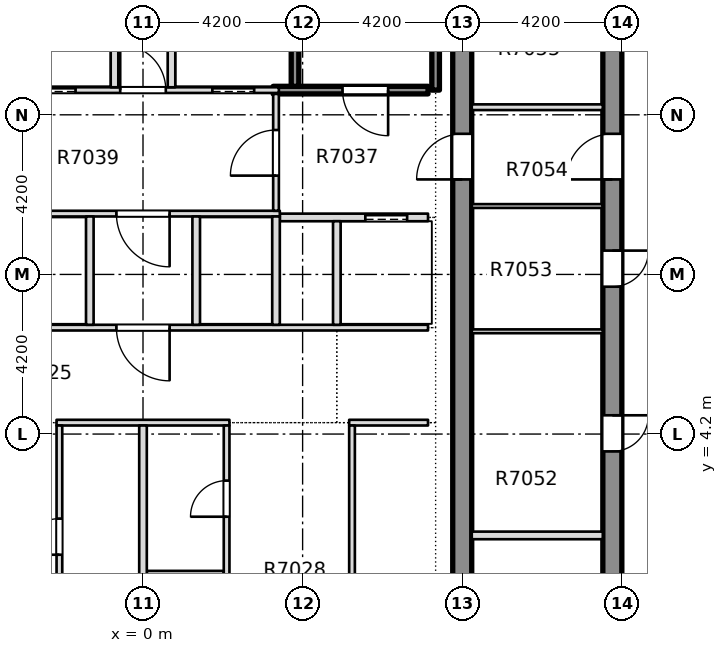
"""IFC4 building model, lengths in metres.
Left out: names, types, materials, properties, quantities, classifications, styles, units other than length and angle.
Written with IfcOpenShell. Run it as: python <this file> out.ifc"""

import sys

from ifc_helpers import new_model, si_unit, direction, frame, frame_2d, origin, place, context, subcontext, project, spatial, rectangle, extrude, element, fill, save


model = new_model("IFC4")
c1 = context("Model", 3, precision=1e-05, world=origin(), true_north=direction((0.0, 1.0)))
c2 = subcontext(c1, "Body", "Model", "MODEL_VIEW")
j1 = project(units=[si_unit("LENGTHUNIT", "METRE"), si_unit("PLANEANGLEUNIT", "RADIAN")], contexts=[c1])
p1 = place(None, origin())
s1 = spatial("IfcSite", under=j1, at=p1, CompositionType="ELEMENT")
p2 = place(p1, origin())
s2 = spatial("IfcBuilding", under=s1, at=p2, CompositionType="ELEMENT")
p3 = place(p2, frame((0.0, 0.0, 264.85)))
s3 = spatial("IfcBuildingStorey", under=s2, at=p3, CompositionType="ELEMENT", Elevation=264.85)
p4 = place(p3, frame((12.35, -8.4, -0.5), z_axis=(0.0, 0.0, 1.0), x_axis=(0.0, 1.0, 0.0)))
e1 = element("IfcWall", 1, at=p4, inside=s3, PredefinedType="SHEAR", context=c2, shape_type="SweptSolid", body=[
    extrude(rectangle(XDim=30.15, YDim=0.5, at=frame_2d((15.075, 0.0))), origin(), (0.0, 0.0, 1.0), 4.5),
])
p5 = place(p4, frame((3.416, 0.0, 0.5)))
e2 = element("IfcOpeningElement", 2, at=p5, cuts=e1, PredefinedType="OPENING", context=c2, shape_type="SweptSolid", body=[
    extrude(rectangle(XDim=0.95, YDim=2.1, at=frame_2d((0.475, 1.05))), frame((0.0, 0.26, 0.0), z_axis=(0.0, -1.0, 0.0), x_axis=(1.0, 0.0, 0.0)), (0.0, 0.0, 1.0), 0.52),
])
p6 = place(p4, frame((7.932, 0.0, 0.5)))
e3 = element("IfcOpeningElement", 3, at=p6, cuts=e1, PredefinedType="OPENING", context=c2, shape_type="SweptSolid", body=[
    extrude(rectangle(XDim=0.95, YDim=2.1, at=frame_2d((0.475, 1.05))), frame((0.0, 0.26, 0.0), z_axis=(0.0, -1.0, 0.0), x_axis=(1.0, 0.0, 0.0)), (0.0, 0.0, 1.0), 0.52),
])
p7 = place(p4, frame((12.144, 0.0, 0.5)))
e4 = element("IfcOpeningElement", 4, at=p7, cuts=e1, PredefinedType="OPENING", context=c2, shape_type="SweptSolid", body=[
    extrude(rectangle(XDim=0.95, YDim=2.1, at=frame_2d((0.475, 1.05))), frame((0.0, 0.26, 0.0), z_axis=(0.0, -1.0, 0.0), x_axis=(1.0, 0.0, 0.0)), (0.0, 0.0, 1.0), 0.52),
])
p8 = place(p4, frame((16.477, 0.0, 0.5)))
e5 = element("IfcOpeningElement", 5, at=p8, cuts=e1, PredefinedType="OPENING", context=c2, shape_type="SweptSolid", body=[
    extrude(rectangle(XDim=0.95, YDim=2.1, at=frame_2d((0.475, 1.05))), frame((0.0, 0.26, 0.0), z_axis=(0.0, -1.0, 0.0), x_axis=(1.0, 0.0, 0.0)), (0.0, 0.0, 1.0), 0.52),
])
p9 = place(p4, frame((23.605, 0.0, 0.5)))
e6 = element("IfcOpeningElement", 6, at=p9, cuts=e1, PredefinedType="OPENING", context=c2, shape_type="SweptSolid", body=[
    extrude(rectangle(XDim=0.95, YDim=2.1, at=frame_2d((0.475, 1.05))), frame((0.0, 0.26, 0.0), z_axis=(0.0, -1.0, 0.0), x_axis=(1.0, 0.0, 0.0)), (0.0, 0.0, 1.0), 0.52),
])
p10 = place(p4, frame((27.63, 0.0, 0.5)))
e7 = element("IfcOpeningElement", 7, at=p10, cuts=e1, PredefinedType="OPENING", context=c2, shape_type="SweptSolid", body=[
    extrude(rectangle(XDim=0.95, YDim=2.1, at=frame_2d((0.475, 1.05))), frame((0.0, 0.26, 0.0), z_axis=(0.0, -1.0, 0.0), x_axis=(1.0, 0.0, 0.0)), (0.0, 0.0, 1.0), 0.52),
])
p11 = place(p4, frame((19.3, 0.0, 0.5)))
e8 = element("IfcOpeningElement", 8, at=p11, cuts=e1, PredefinedType="OPENING", context=c2, shape_type="SweptSolid", body=[
    extrude(rectangle(XDim=1.2, YDim=2.1, at=frame_2d((0.6, 1.05))), frame((0.0, 0.26, 0.0), z_axis=(0.0, -1.0, 0.0), x_axis=(1.0, 0.0, 0.0)), (0.0, 0.0, 1.0), 0.52),
])
p12 = place(p3, frame((8.4, -7.9, -0.5), z_axis=(0.0, 0.0, 1.0), x_axis=(0.0, 1.0, 0.0)))
e9 = element("IfcWall", 9, at=p12, inside=s3, PredefinedType="SHEAR", context=c2, shape_type="SweptSolid", body=[
    extrude(rectangle(XDim=29.15, YDim=0.5, at=frame_2d((14.575, 0.0))), origin(), (0.0, 0.0, 1.0), 4.5),
])
p13 = place(p12, frame((18.8, 0.0, 0.5)))
e10 = element("IfcOpeningElement", 10, at=p13, cuts=e9, PredefinedType="OPENING", context=c2, shape_type="SweptSolid", body=[
    extrude(rectangle(XDim=1.2, YDim=2.1, at=frame_2d((0.6, 1.05))), frame((0.0, 0.26, 0.0), z_axis=(0.0, -1.0, 0.0), x_axis=(1.0, 0.0, 0.0)), (0.0, 0.0, 1.0), 0.52),
])
p14 = place(p3, frame((0.1, 0.5, 0.0), z_axis=(0.0, 0.0, 1.0), x_axis=(1.0, 0.0, 0.0)))
e11 = element("IfcWall", 11, at=p14, inside=s3, PredefinedType="PARTITIONING", context=c2, shape_type="SweptSolid", body=[
    extrude(rectangle(XDim=2.025, YDim=0.2, at=frame_2d((1.012, 0.0))), origin(), (0.0, 0.0, 1.0), 4.0),
])
p15 = place(p3, frame((-2.275, 4.5, 0.0), z_axis=(0.0, 0.0, 1.0), x_axis=(1.0, 0.0, 0.0)))
e12 = element("IfcWall", 12, at=p15, inside=s3, PredefinedType="PARTITIONING", context=c2, shape_type="SweptSolid", body=[
    extrude(rectangle(XDim=4.55, YDim=0.15, at=frame_2d((2.275, 0.0))), origin(), (0.0, 0.0, 1.0), 2.5),
])
p16 = place(p3, frame((5.425, 4.5, 0.0), z_axis=(0.0, 0.0, 1.0), x_axis=(1.0, 0.0, 0.0)))
e13 = element("IfcWall", 13, at=p16, inside=s3, PredefinedType="PARTITIONING", context=c2, shape_type="SweptSolid", body=[
    extrude(rectangle(XDim=2.075, YDim=0.15, at=frame_2d((1.038, 0.0))), origin(), (0.0, 0.0, 1.0), 2.5),
])
p17 = place(p3, frame((-7.5, 7.0, 0.0), z_axis=(0.0, 0.0, 1.0), x_axis=(1.0, 0.0, 0.0)))
e14 = element("IfcWall", 14, at=p17, inside=s3, PredefinedType="PARTITIONING", context=c2, shape_type="SweptSolid", body=[
    extrude(rectangle(XDim=15.0, YDim=0.15, at=frame_2d((7.5, 0.0))), origin(), (0.0, 0.0, 1.0), 4.0),
])
p18 = place(p17, frame((6.8, 0.0, 0.0)))
e15 = element("IfcOpeningElement", 15, at=p18, cuts=e14, PredefinedType="OPENING", context=c2, shape_type="SweptSolid", body=[
    extrude(rectangle(XDim=1.4, YDim=2.1, at=frame_2d((0.7, 1.05))), frame((0.0, 0.085, 0.0), z_axis=(0.0, -1.0, 0.0), x_axis=(1.0, 0.0, 0.0)), (0.0, 0.0, 1.0), 0.17),
])
p19 = place(p3, frame((3.6, 9.9, 0.0), z_axis=(0.0, 0.0, 1.0), x_axis=(1.0, 0.0, 0.0)))
e16 = element("IfcWall", 16, at=p19, inside=s3, PredefinedType="PARTITIONING", context=c2, shape_type="SweptSolid", body=[
    extrude(rectangle(XDim=3.9, YDim=0.2, at=frame_2d((1.95, 0.0))), origin(), (0.0, 0.0, 1.0), 4.0),
])
p20 = place(p19, frame((2.25, 0.0, 0.0)))
e17 = element("IfcOpeningElement", 17, at=p20, cuts=e16, PredefinedType="OPENING", context=c2, shape_type="SweptSolid", body=[
    extrude(rectangle(XDim=1.1, YDim=2.1, at=frame_2d((0.55, 1.05))), frame((0.0, 0.11, 0.0), z_axis=(0.0, -1.0, 0.0), x_axis=(1.0, 0.0, 0.0)), (0.0, 0.0, 1.0), 0.22),
])
p21 = place(p3, frame((-3.6, 10.0, 0.0), z_axis=(0.0, 0.0, 1.0), x_axis=(1.0, 0.0, 0.0)))
e18 = element("IfcWall", 18, at=p21, inside=s3, PredefinedType="PARTITIONING", context=c2, shape_type="SweptSolid", body=[
    extrude(rectangle(XDim=7.2, YDim=0.15, at=frame_2d((3.6, 0.0))), origin(), (0.0, 0.0, 1.0), 4.0),
])
p22 = place(p21, frame((2.9, 0.0, 0.0)))
e19 = element("IfcOpeningElement", 19, at=p22, cuts=e18, PredefinedType="OPENING", context=c2, shape_type="SweptSolid", body=[
    extrude(rectangle(XDim=1.4, YDim=2.1, at=frame_2d((0.7, 1.05))), frame((0.0, 0.085, 0.0), z_axis=(0.0, -1.0, 0.0), x_axis=(1.0, 0.0, 0.0)), (0.0, 0.0, 1.0), 0.17),
])
p23 = place(p3, frame((-3.575, 13.25, 0.0), z_axis=(0.0, 0.0, 1.0), x_axis=(1.0, 0.0, 0.0)))
e20 = element("IfcWall", 20, at=p23, inside=s3, PredefinedType="PARTITIONING", context=c2, shape_type="SweptSolid", body=[
    extrude(rectangle(XDim=7.15, YDim=0.15, at=frame_2d((3.575, 0.0))), origin(), (0.0, 0.0, 1.0), 4.0),
])
p24 = place(p23, frame((0.6, 0.0, 0.0)))
e21 = element("IfcOpeningElement", 21, at=p24, cuts=e20, PredefinedType="OPENING", context=c2, shape_type="SweptSolid", body=[
    extrude(rectangle(XDim=1.2, YDim=2.1, at=frame_2d((0.6, 1.05))), frame((0.0, 0.085, 0.0), z_axis=(0.0, -1.0, 0.0), x_axis=(1.0, 0.0, 0.0)), (0.0, 0.0, 1.0), 0.17),
])
p25 = place(p23, frame((5.4, 0.0, 0.0)))
e22 = element("IfcOpeningElement", 22, at=p25, cuts=e20, PredefinedType="OPENING", context=c2, shape_type="SweptSolid", body=[
    extrude(rectangle(XDim=1.1, YDim=2.1, at=frame_2d((0.55, 1.05))), frame((0.0, 0.085, 0.0), z_axis=(0.0, -1.0, 0.0), x_axis=(1.0, 0.0, 0.0)), (0.0, 0.0, 1.0), 0.17),
])
p26 = place(p23, frame((2.975, 0.0, 0.0)))
e23 = element("IfcOpeningElement", 23, at=p26, cuts=e20, PredefinedType="OPENING", context=c2, shape_type="SweptSolid", body=[
    extrude(rectangle(XDim=1.2, YDim=2.1, at=frame_2d((0.6, 1.05))), frame((0.0, 0.085, 0.0), z_axis=(0.0, -1.0, 0.0), x_axis=(1.0, 0.0, 0.0)), (0.0, 0.0, 1.0), 0.17),
])
p27 = place(p3, frame((3.425, 13.25, 0.0), z_axis=(0.0, 0.0, 1.0), x_axis=(1.0, 0.0, 0.0)))
e24 = element("IfcWall", 24, at=p27, inside=s3, PredefinedType="SOLIDWALL", context=c2, shape_type="SweptSolid", body=[
    extrude(rectangle(XDim=4.075, YDim=0.2, at=frame_2d((2.038, 0.0))), origin(), (0.0, 0.0, 1.0), 4.0),
])
p28 = place(p27, frame((1.825, 0.0, 0.0)))
e25 = element("IfcOpeningElement", 25, at=p28, cuts=e24, PredefinedType="OPENING", context=c2, shape_type="SweptSolid", body=[
    extrude(rectangle(XDim=1.2, YDim=2.1, at=frame_2d((0.6, 1.05))), frame((0.0, 0.11, 0.0), z_axis=(0.0, -1.0, 0.0), x_axis=(1.0, 0.0, 0.0)), (0.0, 0.0, 1.0), 0.22),
])
p29 = place(p3, frame((-2.2, -7.899, 0.0), z_axis=(0.0, 0.0, 1.0), x_axis=(0.0, 1.0, 0.0)))
e26 = element("IfcWall", 26, at=p29, inside=s3, PredefinedType="PARTITIONING", context=c2, shape_type="SweptSolid", body=[
    extrude(rectangle(XDim=12.324, YDim=0.15, at=frame_2d((6.162, 0.0))), origin(), (0.0, 0.0, 1.0), 4.0),
])
p30 = place(p29, frame((1.349, 0.0, 0.0)))
e27 = element("IfcOpeningElement", 27, at=p30, cuts=e26, PredefinedType="OPENING", context=c2, shape_type="SweptSolid", body=[
    extrude(rectangle(XDim=1.1, YDim=2.1, at=frame_2d((0.55, 1.05))), frame((0.0, 0.085, 0.0), z_axis=(0.0, -1.0, 0.0), x_axis=(1.0, 0.0, 0.0)), (0.0, 0.0, 1.0), 0.17),
])
p31 = place(p29, frame((4.424, 0.0, 0.0)))
e28 = element("IfcOpeningElement", 28, at=p31, cuts=e26, PredefinedType="OPENING", context=c2, shape_type="SweptSolid", body=[
    extrude(rectangle(XDim=0.95, YDim=2.1, at=frame_2d((0.475, 1.05))), frame((0.0, 0.085, 0.0), z_axis=(0.0, -1.0, 0.0), x_axis=(1.0, 0.0, 0.0)), (0.0, 0.0, 1.0), 0.17),
])
p32 = place(p29, frame((8.924, 0.0, 0.0)))
e29 = element("IfcOpeningElement", 29, at=p32, cuts=e26, PredefinedType="OPENING", context=c2, shape_type="SweptSolid", body=[
    extrude(rectangle(XDim=0.95, YDim=2.1, at=frame_2d((0.475, 1.05))), frame((0.0, 0.085, 0.0), z_axis=(0.0, -1.0, 0.0), x_axis=(1.0, 0.0, 0.0)), (0.0, 0.0, 1.0), 0.17),
])
p33 = place(p3, frame((-1.4, 7.075, 0.0), z_axis=(0.0, 0.0, 1.0), x_axis=(0.0, 1.0, 0.0)))
e30 = element("IfcWall", 30, at=p33, inside=s3, PredefinedType="PARTITIONING", context=c2, shape_type="SweptSolid", body=[
    extrude(rectangle(XDim=2.85, YDim=0.2, at=frame_2d((1.425, 0.0))), origin(), (0.0, 0.0, 1.0), 4.0),
])
p34 = place(p3, frame((-0.75, 13.325, 0.0), z_axis=(0.0, 0.0, 1.0), x_axis=(0.0, 1.0, 0.0)))
e31 = element("IfcWall", 31, at=p34, inside=s3, PredefinedType="PARTITIONING", context=c2, shape_type="SweptSolid", body=[
    extrude(rectangle(XDim=7.924, YDim=0.2, at=frame_2d((3.962, 0.0))), origin(), (0.0, 0.0, 1.0), 4.0),
])
p35 = place(p34, frame((4.8, 0.0, 0.0)))
e32 = element("IfcOpeningElement", 32, at=p35, cuts=e31, PredefinedType="OPENING", context=c2, shape_type="SweptSolid", body=[
    extrude(rectangle(XDim=0.95, YDim=2.1, at=frame_2d((0.475, 1.05))), frame((0.0, 0.11, 0.0), z_axis=(0.0, -1.0, 0.0), x_axis=(1.0, 0.0, 0.0)), (0.0, 0.0, 1.0), 0.22),
])
p36 = place(p3, frame((0.0, -7.899, 0.0), z_axis=(0.0, 0.0, 1.0), x_axis=(0.0, 1.0, 0.0)))
e33 = element("IfcWall", 33, at=p36, inside=s3, PredefinedType="PARTITIONING", context=c2, shape_type="SweptSolid", body=[
    extrude(rectangle(XDim=12.324, YDim=0.2, at=frame_2d((6.162, 0.0))), origin(), (0.0, 0.0, 1.0), 4.0),
])
p37 = place(p3, frame((0.75, 13.325, 0.0), z_axis=(0.0, 0.0, 1.0), x_axis=(0.0, 1.0, 0.0)))
e34 = element("IfcWall", 34, at=p37, inside=s3, PredefinedType="PARTITIONING", context=c2, shape_type="SweptSolid", body=[
    extrude(rectangle(XDim=2.625, YDim=0.2, at=frame_2d((1.312, 0.0))), origin(), (0.0, 0.0, 1.0), 4.0),
])
p38 = place(p3, frame((1.4, 7.075, 0.0), z_axis=(0.0, 0.0, 1.0), x_axis=(0.0, 1.0, 0.0)))
e35 = element("IfcWall", 35, at=p38, inside=s3, PredefinedType="PARTITIONING", context=c2, shape_type="SweptSolid", body=[
    extrude(rectangle(XDim=2.85, YDim=0.2, at=frame_2d((1.425, 0.0))), origin(), (0.0, 0.0, 1.0), 4.0),
])
p39 = place(p3, frame((2.2, -7.899, 0.0), z_axis=(0.0, 0.0, 1.0), x_axis=(0.0, 1.0, 0.0)))
e36 = element("IfcWall", 36, at=p39, inside=s3, PredefinedType="PARTITIONING", context=c2, shape_type="SweptSolid", body=[
    extrude(rectangle(XDim=12.324, YDim=0.15, at=frame_2d((6.162, 0.0))), origin(), (0.0, 0.0, 1.0), 4.0),
])
p40 = place(p39, frame((1.924, 0.0, 0.0)))
e37 = element("IfcOpeningElement", 37, at=p40, cuts=e36, PredefinedType="OPENING", context=c2, shape_type="SweptSolid", body=[
    extrude(rectangle(XDim=0.95, YDim=2.1, at=frame_2d((0.475, 1.05))), frame((0.0, 0.085, 0.0), z_axis=(0.0, -1.0, 0.0), x_axis=(1.0, 0.0, 0.0)), (0.0, 0.0, 1.0), 0.17),
])
p41 = place(p39, frame((5.924, 0.0, 0.0)))
e38 = element("IfcOpeningElement", 38, at=p41, cuts=e36, PredefinedType="OPENING", context=c2, shape_type="SweptSolid", body=[
    extrude(rectangle(XDim=0.95, YDim=2.1, at=frame_2d((0.475, 1.05))), frame((0.0, 0.085, 0.0), z_axis=(0.0, -1.0, 0.0), x_axis=(1.0, 0.0, 0.0)), (0.0, 0.0, 1.0), 0.17),
])
p42 = place(p39, frame((9.924, 0.0, 0.0)))
e39 = element("IfcOpeningElement", 39, at=p42, cuts=e36, PredefinedType="OPENING", context=c2, shape_type="SweptSolid", body=[
    extrude(rectangle(XDim=0.95, YDim=2.1, at=frame_2d((0.475, 1.05))), frame((0.0, 0.085, 0.0), z_axis=(0.0, -1.0, 0.0), x_axis=(1.0, 0.0, 0.0)), (0.0, 0.0, 1.0), 0.17),
])
p43 = place(p3, frame((3.5, 7.075, 0.0), z_axis=(0.0, 0.0, 1.0), x_axis=(0.0, 1.0, 0.0)))
e40 = element("IfcWall", 40, at=p43, inside=s3, PredefinedType="PARTITIONING", context=c2, shape_type="SweptSolid", body=[
    extrude(rectangle(XDim=2.85, YDim=0.2, at=frame_2d((1.425, 0.0))), origin(), (0.0, 0.0, 1.0), 4.0),
])
p44 = place(p3, frame((3.5, 10.075, 0.0), z_axis=(0.0, 0.0, 1.0), x_axis=(0.0, 1.0, 0.0)))
e41 = element("IfcWall", 41, at=p44, inside=s3, PredefinedType="PARTITIONING", context=c2, shape_type="SweptSolid", body=[
    extrude(rectangle(XDim=3.075, YDim=0.15, at=frame_2d((1.538, 0.0))), origin(), (0.0, 0.0, 1.0), 4.0),
])
p45 = place(p44, frame((0.925, 0.0, 0.0)))
e42 = element("IfcOpeningElement", 42, at=p45, cuts=e41, PredefinedType="OPENING", context=c2, shape_type="SweptSolid", body=[
    extrude(rectangle(XDim=1.2, YDim=2.1, at=frame_2d((0.6, 1.05))), frame((0.0, 0.085, 0.0), z_axis=(0.0, -1.0, 0.0), x_axis=(1.0, 0.0, 0.0)), (0.0, 0.0, 1.0), 0.17),
])
p46 = place(p3, frame((4.0, 13.35, 0.0), z_axis=(0.0, 0.0, 1.0), x_axis=(0.0, 1.0, 0.0)))
e43 = element("IfcWall", 43, at=p46, inside=s3, PredefinedType="SOLIDWALL", context=c2, shape_type="SweptSolid", body=[
    extrude(rectangle(XDim=2.6, YDim=0.2, at=frame_2d((1.3, 0.0))), origin(), (0.0, 0.0, 1.0), 4.0),
])
p47 = place(p3, frame((5.1, 7.075, 0.0), z_axis=(0.0, 0.0, 1.0), x_axis=(0.0, 1.0, 0.0)))
e44 = element("IfcWall", 44, at=p47, inside=s3, PredefinedType="PARTITIONING", context=c2, shape_type="SweptSolid", body=[
    extrude(rectangle(XDim=2.725, YDim=0.2, at=frame_2d((1.363, 0.0))), origin(), (0.0, 0.0, 1.0), 4.0),
])
p48 = place(p3, frame((5.5, -7.899, 0.0), z_axis=(0.0, 0.0, 1.0), x_axis=(0.0, 1.0, 0.0)))
e45 = element("IfcWall", 45, at=p48, inside=s3, PredefinedType="PARTITIONING", context=c2, shape_type="SweptSolid", body=[
    extrude(rectangle(XDim=12.324, YDim=0.15, at=frame_2d((6.162, 0.0))), origin(), (0.0, 0.0, 1.0), 4.0),
])
p49 = place(p48, frame((5.924, 0.0, 0.0)))
e46 = element("IfcOpeningElement", 46, at=p49, cuts=e45, PredefinedType="OPENING", context=c2, shape_type="SweptSolid", body=[
    extrude(rectangle(XDim=0.95, YDim=2.1, at=frame_2d((0.475, 1.05))), frame((0.0, 0.085, 0.0), z_axis=(0.0, -1.0, 0.0), x_axis=(1.0, 0.0, 0.0)), (0.0, 0.0, 1.0), 0.17),
])
p50 = place(p3, frame((8.651, 1.533, 0.0), z_axis=(0.0, 0.0, 1.0), x_axis=(1.0, 0.0, 0.0)))
e47 = element("IfcWall", 47, at=p50, inside=s3, PredefinedType="PARTITIONING", context=c2, shape_type="SweptSolid", body=[
    extrude(rectangle(XDim=3.448, YDim=0.2, at=frame_2d((1.724, 0.0))), origin(), (0.0, 0.0, 1.0), 4.0),
])
for number, where, z_axis, x_axis in (
    (48, (8.651, 6.904, 0.0), (0.0, 0.0, 1.0), (1.0, 0.0, 0.0)),
    (49, (8.651, 10.2, 0.0), (0.0, 0.0, 1.0), (1.0, 0.0, 0.0)),
):
    element("IfcWall", number, at=place(p3, frame(where, z_axis=z_axis, x_axis=x_axis)), inside=s3, PredefinedType="PARTITIONING", context=c2, shape_type="SweptSolid", body=[
        extrude(rectangle(XDim=3.448, YDim=0.1, at=frame_2d((1.724, 0.0))), origin(), (0.0, 0.0, 1.0), 4.0),
    ])
p51 = place(p3, frame((8.651, 12.8, 0.0), z_axis=(0.0, 0.0, 1.0), x_axis=(1.0, 0.0, 0.0)))
e50 = element("IfcWall", 50, at=p51, inside=s3, PredefinedType="PARTITIONING", context=c2, shape_type="SweptSolid", body=[
    extrude(rectangle(XDim=3.448, YDim=0.15, at=frame_2d((1.724, 0.0))), origin(), (0.0, 0.0, 1.0), 2.5),
])
p52 = place(p3, frame((7.7, 13.25, 0.0), z_axis=(0.0, 0.0, 1.0), x_axis=(0.0, 1.0, 0.0)))
e51 = element("IfcWall", 51, at=p52, inside=s3, PredefinedType="SOLIDWALL", context=c2, shape_type="SweptSolid", body=[
    extrude(rectangle(XDim=7.6, YDim=0.2, at=frame_2d((3.8, 0.0))), origin(), (0.0, 0.0, 1.0), 4.0),
])
p53 = place(p32, origin())
e52 = element("IfcDoor", 52, at=p53, inside=s3, OperationType="SINGLE_SWING_LEFT", PredefinedType="DOOR", context=c2, shape_type="SweptSolid", body=[
    extrude(rectangle(XDim=0.95, YDim=2.1, at=frame_2d((0.475, 1.05))), frame((0.0, 0.025, 0.0), z_axis=(0.0, -1.0, 0.0), x_axis=(1.0, 0.0, 0.0)), (0.0, 0.0, 1.0), 0.05),
])
fill(e29, e52)
p54 = place(p42, origin())
e53 = element("IfcDoor", 53, at=p54, inside=s3, OperationType="SINGLE_SWING_LEFT", PredefinedType="DOOR", context=c2, shape_type="SweptSolid", body=[
    extrude(rectangle(XDim=0.95, YDim=2.1, at=frame_2d((0.475, 1.05))), frame((0.0, 0.025, 0.0), z_axis=(0.0, -1.0, 0.0), x_axis=(1.0, 0.0, 0.0)), (0.0, 0.0, 1.0), 0.05),
])
fill(e39, e53)
p55 = place(p28, origin())
e54 = element("IfcDoor", 54, at=p55, inside=s3, OperationType="SINGLE_SWING_RIGHT", PredefinedType="DOOR", context=c2, shape_type="SweptSolid", body=[
    extrude(rectangle(XDim=1.2, YDim=2.1, at=frame_2d((0.6, 1.05))), frame((0.0, 0.025, 0.0), z_axis=(0.0, -1.0, 0.0), x_axis=(1.0, 0.0, 0.0)), (0.0, 0.0, 1.0), 0.05),
])
fill(e25, e54)
p56 = place(p20, origin())
e55 = element("IfcDoor", 55, at=p56, inside=s3, OperationType="SLIDING_TO_LEFT", PredefinedType="DOOR", context=c2, shape_type="SweptSolid", body=[
    extrude(rectangle(XDim=1.1, YDim=2.1, at=frame_2d((0.55, 1.05))), frame((0.0, 0.025, 0.0), z_axis=(0.0, -1.0, 0.0), x_axis=(1.0, 0.0, 0.0)), (0.0, 0.0, 1.0), 0.05),
])
fill(e17, e55)
p57 = place(p18, origin())
e56 = element("IfcDoor", 56, at=p57, inside=s3, OperationType="SINGLE_SWING_RIGHT", PredefinedType="DOOR", context=c2, shape_type="SweptSolid", body=[
    extrude(rectangle(XDim=1.4, YDim=2.1, at=frame_2d((0.7, 1.05))), frame((0.0, 0.025, 0.0), z_axis=(0.0, -1.0, 0.0), x_axis=(1.0, 0.0, 0.0)), (0.0, 0.0, 1.0), 0.05),
])
fill(e15, e56)
p58 = place(p22, origin())
e57 = element("IfcDoor", 57, at=p58, inside=s3, OperationType="SINGLE_SWING_RIGHT", PredefinedType="DOOR", context=c2, shape_type="SweptSolid", body=[
    extrude(rectangle(XDim=1.4, YDim=2.1, at=frame_2d((0.7, 1.05))), frame((0.0, 0.025, 0.0), z_axis=(0.0, -1.0, 0.0), x_axis=(1.0, 0.0, 0.0)), (0.0, 0.0, 1.0), 0.05),
])
fill(e19, e57)
p59 = place(p24, origin())
e58 = element("IfcDoor", 58, at=p59, inside=s3, OperationType="SLIDING_TO_RIGHT", PredefinedType="DOOR", context=c2, shape_type="SweptSolid", body=[
    extrude(rectangle(XDim=1.2, YDim=2.1, at=frame_2d((0.6, 1.05))), frame((0.0, 0.025, 0.0), z_axis=(0.0, -1.0, 0.0), x_axis=(1.0, 0.0, 0.0)), (0.0, 0.0, 1.0), 0.05),
])
fill(e21, e58)
p60 = place(p25, origin())
e59 = element("IfcDoor", 59, at=p60, inside=s3, OperationType="SLIDING_TO_LEFT", PredefinedType="DOOR", context=c2, shape_type="SweptSolid", body=[
    extrude(rectangle(XDim=1.1, YDim=2.1, at=frame_2d((0.55, 1.05))), frame((0.0, 0.025, 0.0), z_axis=(0.0, -1.0, 0.0), x_axis=(1.0, 0.0, 0.0)), (0.0, 0.0, 1.0), 0.05),
])
fill(e22, e59)
p61 = place(p26, origin())
e60 = element("IfcDoor", 60, at=p61, inside=s3, OperationType="SINGLE_SWING_RIGHT", PredefinedType="DOOR", context=c2, shape_type="SweptSolid", body=[
    extrude(rectangle(XDim=1.2, YDim=2.1, at=frame_2d((0.6, 1.05))), frame((0.0, 0.025, 0.0), z_axis=(0.0, -1.0, 0.0), x_axis=(1.0, 0.0, 0.0)), (0.0, 0.0, 1.0), 0.05),
])
fill(e23, e60)
p62 = place(p45, origin())
e61 = element("IfcDoor", 61, at=p62, inside=s3, OperationType="SINGLE_SWING_LEFT", PredefinedType="DOOR", context=c2, shape_type="SweptSolid", body=[
    extrude(rectangle(XDim=1.2, YDim=2.1, at=frame_2d((0.6, 1.05))), frame((0.0, 0.025, 0.0), z_axis=(0.0, -1.0, 0.0), x_axis=(1.0, 0.0, 0.0)), (0.0, 0.0, 1.0), 0.05),
])
fill(e42, e61)
p63 = place(p7, origin())
e62 = element("IfcDoor", 62, at=p63, inside=s3, OperationType="SINGLE_SWING_LEFT", PredefinedType="DOOR", context=c2, shape_type="SweptSolid", body=[
    extrude(rectangle(XDim=0.95, YDim=2.1, at=frame_2d((0.475, 1.05))), frame((0.0, 0.025, 0.0), z_axis=(0.0, -1.0, 0.0), x_axis=(1.0, 0.0, 0.0)), (0.0, 0.0, 1.0), 0.05),
])
fill(e4, e62)
p64 = place(p8, origin())
e63 = element("IfcDoor", 63, at=p64, inside=s3, OperationType="SINGLE_SWING_LEFT", PredefinedType="DOOR", context=c2, shape_type="SweptSolid", body=[
    extrude(rectangle(XDim=0.95, YDim=2.1, at=frame_2d((0.475, 1.05))), frame((0.0, 0.025, 0.0), z_axis=(0.0, -1.0, 0.0), x_axis=(1.0, 0.0, 0.0)), (0.0, 0.0, 1.0), 0.05),
])
fill(e5, e63)
p65 = place(p11, origin())
e64 = element("IfcDoor", 64, at=p65, inside=s3, OperationType="SINGLE_SWING_LEFT", PredefinedType="DOOR", context=c2, shape_type="SweptSolid", body=[
    extrude(rectangle(XDim=1.2, YDim=2.1, at=frame_2d((0.6, 1.05))), frame((0.0, 0.025, 0.0), z_axis=(0.0, -1.0, 0.0), x_axis=(1.0, 0.0, 0.0)), (0.0, 0.0, 1.0), 0.05),
])
fill(e8, e64)
p66 = place(p13, origin())
e65 = element("IfcDoor", 65, at=p66, inside=s3, OperationType="SINGLE_SWING_LEFT", PredefinedType="DOOR", context=c2, shape_type="SweptSolid", body=[
    extrude(rectangle(XDim=1.2, YDim=2.1, at=frame_2d((0.6, 1.05))), frame((0.0, 0.025, 0.0), z_axis=(0.0, -1.0, 0.0), x_axis=(1.0, 0.0, 0.0)), (0.0, 0.0, 1.0), 0.05),
])
fill(e10, e65)
save(model, sys.argv[1])
